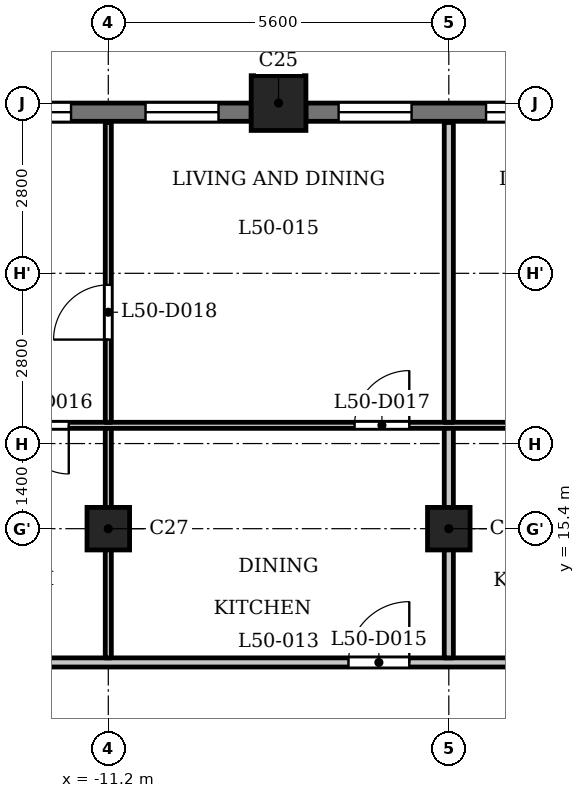
"""IFC4 building model, lengths in metres.
Left out: names, types, materials, properties, quantities, classifications, styles, units other than length and angle.
Written with IfcOpenShell. Run it as: python <this file> out.ifc"""

import sys

from ifc_helpers import new_model, si_unit, direction, frame, frame_2d, origin, origin_2d, place, context, subcontext, project, spatial, rectangle, extrude, element, fill, save


model = new_model("IFC4")
c1 = context("Model", 3, precision=1e-05, world=origin(), true_north=direction((0.0, 1.0)))
c2 = subcontext(c1, "Body", "Model", "MODEL_VIEW")
j1 = project(units=[si_unit("LENGTHUNIT", "METRE"), si_unit("PLANEANGLEUNIT", "RADIAN")], contexts=[c1])
p1 = place(None, origin())
s1 = spatial("IfcSite", under=j1, at=p1, CompositionType="ELEMENT")
p2 = place(p1, origin())
s2 = spatial("IfcBuilding", under=s1, at=p2, CompositionType="ELEMENT")
p3 = place(p2, frame((0.0, 0.0, 195.9)))
s3 = spatial("IfcBuildingStorey", under=s2, at=p3, CompositionType="ELEMENT", Elevation=195.9)
p4 = place(p3, frame((-8.4, 22.4, 0.0), z_axis=(0.0, 0.0, 1.0), x_axis=(1.0, 0.0, 0.0)))
e1 = element("IfcColumn", 1, at=p4, inside=s3, PredefinedType="COLUMN", context=c2, shape_type="SweptSolid", body=[
    extrude(rectangle(XDim=0.9, YDim=0.9, at=origin_2d()), origin(), (0.0, 0.0, 1.0), 3.5),
])
for number, where, z_axis, x_axis in (
    (2, (-11.2, 15.4, 0.0), (0.0, 0.0, 1.0), (1.0, 0.0, 0.0)),
    (3, (-5.6, 15.4, 0.0), (0.0, 0.0, 1.0), (1.0, 0.0, 0.0)),
):
    element("IfcColumn", number, at=place(p3, frame(where, z_axis=z_axis, x_axis=x_axis)), inside=s3, PredefinedType="COLUMN", context=c2, shape_type="SweptSolid", body=[
        extrude(rectangle(XDim=0.7, YDim=0.7, at=origin_2d()), origin(), (0.0, 0.0, 1.0), 3.5),
    ])
p5 = place(p3, frame((-3.25, 22.25, 0.0), z_axis=(0.0, 0.0, 1.0), x_axis=(-1.0, 0.0, 0.0)))
e4 = element("IfcWall", 4, at=p5, inside=s3, PredefinedType="SOLIDWALL", context=c2, shape_type="SweptSolid", body=[
    extrude(rectangle(XDim=4.7, YDim=0.3, at=frame_2d((2.35, 0.0))), origin(), (0.0, 0.0, 1.0), 2.5),
])
p6 = place(p5, frame((0.538, 0.0, 0.6)))
e5 = element("IfcOpeningElement", 5, at=p6, cuts=e4, PredefinedType="OPENING", context=c2, shape_type="SweptSolid", body=[
    extrude(rectangle(XDim=1.2, YDim=1.55, at=frame_2d((0.6, 0.775))), frame((0.0, 0.16, 0.0), z_axis=(0.0, -1.0, 0.0), x_axis=(1.0, 0.0, 0.0)), (0.0, 0.0, 1.0), 0.32),
])
p7 = place(p5, frame((2.962, 0.0, 0.6)))
e6 = element("IfcOpeningElement", 6, at=p7, cuts=e4, PredefinedType="OPENING", context=c2, shape_type="SweptSolid", body=[
    extrude(rectangle(XDim=1.2, YDim=1.55, at=frame_2d((0.6, 0.775))), frame((0.0, 0.16, 0.0), z_axis=(0.0, -1.0, 0.0), x_axis=(1.0, 0.0, 0.0)), (0.0, 0.0, 1.0), 0.32),
])
p8 = place(p3, frame((-8.85, 22.25, 0.0), z_axis=(0.0, 0.0, 1.0), x_axis=(-1.0, 0.0, 0.0)))
e7 = element("IfcWall", 7, at=p8, inside=s3, PredefinedType="SOLIDWALL", context=c2, shape_type="SweptSolid", body=[
    extrude(rectangle(XDim=4.7, YDim=0.3, at=frame_2d((2.35, 0.0))), origin(), (0.0, 0.0, 1.0), 2.5),
])
p9 = place(p8, frame((0.538, 0.0, 0.6)))
e8 = element("IfcOpeningElement", 8, at=p9, cuts=e7, PredefinedType="OPENING", context=c2, shape_type="SweptSolid", body=[
    extrude(rectangle(XDim=1.2, YDim=1.55, at=frame_2d((0.6, 0.775))), frame((0.0, 0.16, 0.0), z_axis=(0.0, -1.0, 0.0), x_axis=(1.0, 0.0, 0.0)), (0.0, 0.0, 1.0), 0.32),
])
p10 = place(p8, frame((2.962, 0.0, 0.6)))
e9 = element("IfcOpeningElement", 9, at=p10, cuts=e7, PredefinedType="OPENING", context=c2, shape_type="SweptSolid", body=[
    extrude(rectangle(XDim=1.2, YDim=1.55, at=frame_2d((0.6, 0.775))), frame((0.0, 0.16, 0.0), z_axis=(0.0, -1.0, 0.0), x_axis=(1.0, 0.0, 0.0)), (0.0, 0.0, 1.0), 0.32),
])
p11 = place(p3, frame((-17.4, 13.2, 0.0), z_axis=(0.0, 0.0, 1.0), x_axis=(1.0, 0.0, 0.0)))
e10 = element("IfcWall", 10, at=p11, inside=s3, PredefinedType="PARTITIONING", context=c2, shape_type="SweptSolid", body=[
    extrude(rectangle(XDim=34.8, YDim=0.15, at=frame_2d((17.4, 0.0))), origin(), (0.0, 0.0, 1.0), 3.2),
])
p12 = place(p11, frame((0.25, 0.0, 0.0)))
e11 = element("IfcOpeningElement", 11, at=p12, cuts=e10, PredefinedType="OPENING", context=c2, shape_type="SweptSolid", body=[
    extrude(rectangle(XDim=1.0, YDim=2.1, at=frame_2d((0.5, 1.05))), frame((0.0, 0.085, 0.0), z_axis=(0.0, -1.0, 0.0), x_axis=(1.0, 0.0, 0.0)), (0.0, 0.0, 1.0), 0.17),
])
p13 = place(p11, frame((33.65, 0.0, 0.0)))
e12 = element("IfcOpeningElement", 12, at=p13, cuts=e10, PredefinedType="OPENING", context=c2, shape_type="SweptSolid", body=[
    extrude(rectangle(XDim=1.0, YDim=2.1, at=frame_2d((0.5, 1.05))), frame((0.0, 0.085, 0.0), z_axis=(0.0, -1.0, 0.0), x_axis=(1.0, 0.0, 0.0)), (0.0, 0.0, 1.0), 0.17),
])
p14 = place(p11, frame((10.15, 0.0, 0.0)))
e13 = element("IfcOpeningElement", 13, at=p14, cuts=e10, PredefinedType="OPENING", context=c2, shape_type="SweptSolid", body=[
    extrude(rectangle(XDim=1.0, YDim=2.1, at=frame_2d((0.5, 1.05))), frame((0.0, 0.085, 0.0), z_axis=(0.0, -1.0, 0.0), x_axis=(1.0, 0.0, 0.0)), (0.0, 0.0, 1.0), 0.17),
])
p15 = place(p11, frame((13.55, 0.0, 0.0)))
e14 = element("IfcOpeningElement", 14, at=p15, cuts=e10, PredefinedType="OPENING", context=c2, shape_type="SweptSolid", body=[
    extrude(rectangle(XDim=1.0, YDim=2.1, at=frame_2d((0.5, 1.05))), frame((0.0, 0.085, 0.0), z_axis=(0.0, -1.0, 0.0), x_axis=(1.0, 0.0, 0.0)), (0.0, 0.0, 1.0), 0.17),
])
p16 = place(p11, frame((20.85, 0.0, 0.0)))
e15 = element("IfcOpeningElement", 15, at=p16, cuts=e10, PredefinedType="OPENING", context=c2, shape_type="SweptSolid", body=[
    extrude(rectangle(XDim=1.0, YDim=2.1, at=frame_2d((0.5, 1.05))), frame((0.0, 0.085, 0.0), z_axis=(0.0, -1.0, 0.0), x_axis=(1.0, 0.0, 0.0)), (0.0, 0.0, 1.0), 0.17),
])
p17 = place(p11, frame((23.7, 0.0, 0.0)))
e16 = element("IfcOpeningElement", 16, at=p17, cuts=e10, PredefinedType="OPENING", context=c2, shape_type="SweptSolid", body=[
    extrude(rectangle(XDim=1.0, YDim=2.1, at=frame_2d((0.5, 1.05))), frame((0.0, 0.085, 0.0), z_axis=(0.0, -1.0, 0.0), x_axis=(1.0, 0.0, 0.0)), (0.0, 0.0, 1.0), 0.17),
])
p18 = place(p3, frame((-16.725, 17.1, 0.0), z_axis=(0.0, 0.0, 1.0), x_axis=(1.0, 0.0, 0.0)))
e17 = element("IfcWall", 17, at=p18, inside=s3, PredefinedType="PARTITIONING", context=c2, shape_type="SweptSolid", body=[
    extrude(rectangle(XDim=33.45, YDim=0.1, at=frame_2d((16.725, 0.0))), origin(), (0.0, 0.0, 1.0), 3.2),
])
p19 = place(p18, frame((4.075, 0.0, 0.0)))
e18 = element("IfcOpeningElement", 18, at=p19, cuts=e17, PredefinedType="OPENING", context=c2, shape_type="SweptSolid", body=[
    extrude(rectangle(XDim=0.8, YDim=2.1, at=frame_2d((0.4, 1.05))), frame((0.0, 0.06, 0.0), z_axis=(0.0, -1.0, 0.0), x_axis=(1.0, 0.0, 0.0)), (0.0, 0.0, 1.0), 0.12),
])
p20 = place(p18, frame((9.575, 0.0, 0.0)))
e19 = element("IfcOpeningElement", 19, at=p20, cuts=e17, PredefinedType="OPENING", context=c2, shape_type="SweptSolid", body=[
    extrude(rectangle(XDim=0.9, YDim=2.1, at=frame_2d((0.45, 1.05))), frame((0.0, 0.06, 0.0), z_axis=(0.0, -1.0, 0.0), x_axis=(1.0, 0.0, 0.0)), (0.0, 0.0, 1.0), 0.12),
])
p21 = place(p18, frame((15.175, 0.0, 0.0)))
e20 = element("IfcOpeningElement", 20, at=p21, cuts=e17, PredefinedType="OPENING", context=c2, shape_type="SweptSolid", body=[
    extrude(rectangle(XDim=0.8, YDim=2.1, at=frame_2d((0.4, 1.05))), frame((0.0, 0.06, 0.0), z_axis=(0.0, -1.0, 0.0), x_axis=(1.0, 0.0, 0.0)), (0.0, 0.0, 1.0), 0.12),
])
p22 = place(p18, frame((12.975, 0.0, 0.0)))
e21 = element("IfcOpeningElement", 21, at=p22, cuts=e17, PredefinedType="OPENING", context=c2, shape_type="SweptSolid", body=[
    extrude(rectangle(XDim=0.9, YDim=2.1, at=frame_2d((0.45, 1.05))), frame((0.0, 0.06, 0.0), z_axis=(0.0, -1.0, 0.0), x_axis=(1.0, 0.0, 0.0)), (0.0, 0.0, 1.0), 0.12),
])
p23 = place(p18, frame((17.625, 0.0, 0.0)))
e22 = element("IfcOpeningElement", 22, at=p23, cuts=e17, PredefinedType="OPENING", context=c2, shape_type="SweptSolid", body=[
    extrude(rectangle(XDim=0.8, YDim=2.1, at=frame_2d((0.4, 1.05))), frame((0.0, 0.06, 0.0), z_axis=(0.0, -1.0, 0.0), x_axis=(1.0, 0.0, 0.0)), (0.0, 0.0, 1.0), 0.12),
])
p24 = place(p18, frame((20.025, 0.0, 0.0)))
e23 = element("IfcOpeningElement", 23, at=p24, cuts=e17, PredefinedType="OPENING", context=c2, shape_type="SweptSolid", body=[
    extrude(rectangle(XDim=0.9, YDim=2.1, at=frame_2d((0.45, 1.05))), frame((0.0, 0.06, 0.0), z_axis=(0.0, -1.0, 0.0), x_axis=(1.0, 0.0, 0.0)), (0.0, 0.0, 1.0), 0.12),
])
p25 = place(p18, frame((31.975, 0.0, 0.0)))
e24 = element("IfcOpeningElement", 24, at=p25, cuts=e17, PredefinedType="OPENING", context=c2, shape_type="SweptSolid", body=[
    extrude(rectangle(XDim=0.8, YDim=2.1, at=frame_2d((0.4, 1.05))), frame((0.0, 0.06, 0.0), z_axis=(0.0, -1.0, 0.0), x_axis=(1.0, 0.0, 0.0)), (0.0, 0.0, 1.0), 0.12),
])
p26 = place(p18, frame((29.775, 0.0, 0.0)))
e25 = element("IfcOpeningElement", 25, at=p26, cuts=e17, PredefinedType="OPENING", context=c2, shape_type="SweptSolid", body=[
    extrude(rectangle(XDim=0.9, YDim=2.1, at=frame_2d((0.45, 1.05))), frame((0.0, 0.06, 0.0), z_axis=(0.0, -1.0, 0.0), x_axis=(1.0, 0.0, 0.0)), (0.0, 0.0, 1.0), 0.12),
])
p27 = place(p18, frame((23.025, 0.0, 0.0)))
e26 = element("IfcOpeningElement", 26, at=p27, cuts=e17, PredefinedType="OPENING", context=c2, shape_type="SweptSolid", body=[
    extrude(rectangle(XDim=0.9, YDim=2.1, at=frame_2d((0.45, 1.05))), frame((0.0, 0.06, 0.0), z_axis=(0.0, -1.0, 0.0), x_axis=(1.0, 0.0, 0.0)), (0.0, 0.0, 1.0), 0.12),
])
p28 = place(p18, frame((26.125, 0.0, 0.0)))
e27 = element("IfcOpeningElement", 27, at=p28, cuts=e17, PredefinedType="OPENING", context=c2, shape_type="SweptSolid", body=[
    extrude(rectangle(XDim=0.9, YDim=2.1, at=frame_2d((0.45, 1.05))), frame((0.0, 0.06, 0.0), z_axis=(0.0, -1.0, 0.0), x_axis=(1.0, 0.0, 0.0)), (0.0, 0.0, 1.0), 0.12),
])
p29 = place(p3, frame((-11.2, 13.275, 0.0), z_axis=(0.0, 0.0, 1.0), x_axis=(0.0, 1.0, 0.0)))
e28 = element("IfcWall", 28, at=p29, inside=s3, PredefinedType="PARTITIONING", context=c2, shape_type="SweptSolid", body=[
    extrude(rectangle(XDim=3.775, YDim=0.1, at=frame_2d((1.888, 0.0))), origin(), (0.0, 0.0, 1.0), 3.2),
])
p30 = place(p3, frame((-11.2, 17.15, 0.0), z_axis=(0.0, 0.0, 1.0), x_axis=(0.0, 1.0, 0.0)))
e29 = element("IfcWall", 29, at=p30, inside=s3, PredefinedType="PARTITIONING", context=c2, shape_type="SweptSolid", body=[
    extrude(rectangle(XDim=4.93, YDim=0.1, at=frame_2d((2.465, 0.0))), origin(), (0.0, 0.0, 1.0), 3.2),
])
p31 = place(p30, frame((1.36, 0.0, 0.0)))
e30 = element("IfcOpeningElement", 30, at=p31, cuts=e29, PredefinedType="OPENING", context=c2, shape_type="SweptSolid", body=[
    extrude(rectangle(XDim=0.9, YDim=2.1, at=frame_2d((0.45, 1.05))), frame((0.0, 0.06, 0.0), z_axis=(0.0, -1.0, 0.0), x_axis=(1.0, 0.0, 0.0)), (0.0, 0.0, 1.0), 0.12),
])
p32 = place(p3, frame((-5.6, 13.275, 0.0), z_axis=(0.0, 0.0, 1.0), x_axis=(0.0, 1.0, 0.0)))
e31 = element("IfcWall", 31, at=p32, inside=s3, PredefinedType="PARTITIONING", context=c2, shape_type="SweptSolid", body=[
    extrude(rectangle(XDim=3.775, YDim=0.15, at=frame_2d((1.888, 0.0))), origin(), (0.0, 0.0, 1.0), 3.2),
])
p33 = place(p3, frame((-5.6, 17.15, 0.0), z_axis=(0.0, 0.0, 1.0), x_axis=(0.0, 1.0, 0.0)))
e32 = element("IfcWall", 32, at=p33, inside=s3, PredefinedType="PARTITIONING", context=c2, shape_type="SweptSolid", body=[
    extrude(rectangle(XDim=4.93, YDim=0.15, at=frame_2d((2.465, 0.0))), origin(), (0.0, 0.0, 1.0), 3.2),
])
p34 = place(p14, origin())
e33 = element("IfcDoor", 33, at=p34, inside=s3, OperationType="SINGLE_SWING_LEFT", PredefinedType="DOOR", context=c2, shape_type="SweptSolid", body=[
    extrude(rectangle(XDim=1.0, YDim=2.1, at=frame_2d((0.5, 1.05))), frame((0.0, 0.025, 0.0), z_axis=(0.0, -1.0, 0.0), x_axis=(1.0, 0.0, 0.0)), (0.0, 0.0, 1.0), 0.05),
])
fill(e13, e33)
p35 = place(p19, origin())
e34 = element("IfcDoor", 34, at=p35, inside=s3, OperationType="SINGLE_SWING_RIGHT", PredefinedType="DOOR", context=c2, shape_type="SweptSolid", body=[
    extrude(rectangle(XDim=0.8, YDim=2.1, at=frame_2d((0.4, 1.05))), frame((0.0, 0.025, 0.0), z_axis=(0.0, -1.0, 0.0), x_axis=(1.0, 0.0, 0.0)), (0.0, 0.0, 1.0), 0.05),
])
fill(e18, e34)
p36 = place(p20, origin())
e35 = element("IfcDoor", 35, at=p36, inside=s3, OperationType="SINGLE_SWING_LEFT", PredefinedType="DOOR", context=c2, shape_type="SweptSolid", body=[
    extrude(rectangle(XDim=0.9, YDim=2.1, at=frame_2d((0.45, 1.05))), frame((0.0, 0.025, 0.0), z_axis=(0.0, -1.0, 0.0), x_axis=(1.0, 0.0, 0.0)), (0.0, 0.0, 1.0), 0.05),
])
fill(e19, e35)
p37 = place(p31, origin())
e36 = element("IfcDoor", 36, at=p37, inside=s3, OperationType="SINGLE_SWING_RIGHT", PredefinedType="DOOR", context=c2, shape_type="SweptSolid", body=[
    extrude(rectangle(XDim=0.9, YDim=2.1, at=frame_2d((0.45, 1.05))), frame((0.0, 0.025, 0.0), z_axis=(0.0, -1.0, 0.0), x_axis=(1.0, 0.0, 0.0)), (0.0, 0.0, 1.0), 0.05),
])
fill(e30, e36)
p38 = place(p6, origin())
e37 = element("IfcWindow", 37, at=p38, inside=s3, PartitioningType="SINGLE_PANEL", PredefinedType="WINDOW", context=c2, shape_type="SweptSolid", body=[
    extrude(rectangle(XDim=1.2, YDim=1.55, at=frame_2d((0.6, 0.775))), frame((0.0, 0.03, 0.0), z_axis=(0.0, -1.0, 0.0), x_axis=(1.0, 0.0, 0.0)), (0.0, 0.0, 1.0), 0.06),
])
fill(e5, e37)
p39 = place(p7, origin())
e38 = element("IfcWindow", 38, at=p39, inside=s3, PartitioningType="SINGLE_PANEL", PredefinedType="WINDOW", context=c2, shape_type="SweptSolid", body=[
    extrude(rectangle(XDim=1.2, YDim=1.55, at=frame_2d((0.6, 0.775))), frame((0.0, 0.03, 0.0), z_axis=(0.0, -1.0, 0.0), x_axis=(1.0, 0.0, 0.0)), (0.0, 0.0, 1.0), 0.06),
])
fill(e6, e38)
p40 = place(p9, origin())
e39 = element("IfcWindow", 39, at=p40, inside=s3, PartitioningType="SINGLE_PANEL", PredefinedType="WINDOW", context=c2, shape_type="SweptSolid", body=[
    extrude(rectangle(XDim=1.2, YDim=1.55, at=frame_2d((0.6, 0.775))), frame((0.0, 0.03, 0.0), z_axis=(0.0, -1.0, 0.0), x_axis=(1.0, 0.0, 0.0)), (0.0, 0.0, 1.0), 0.06),
])
fill(e8, e39)
p41 = place(p10, origin())
e40 = element("IfcWindow", 40, at=p41, inside=s3, PartitioningType="SINGLE_PANEL", PredefinedType="WINDOW", context=c2, shape_type="SweptSolid", body=[
    extrude(rectangle(XDim=1.2, YDim=1.55, at=frame_2d((0.6, 0.775))), frame((0.0, 0.03, 0.0), z_axis=(0.0, -1.0, 0.0), x_axis=(1.0, 0.0, 0.0)), (0.0, 0.0, 1.0), 0.06),
])
fill(e9, e40)
save(model, sys.argv[1])
